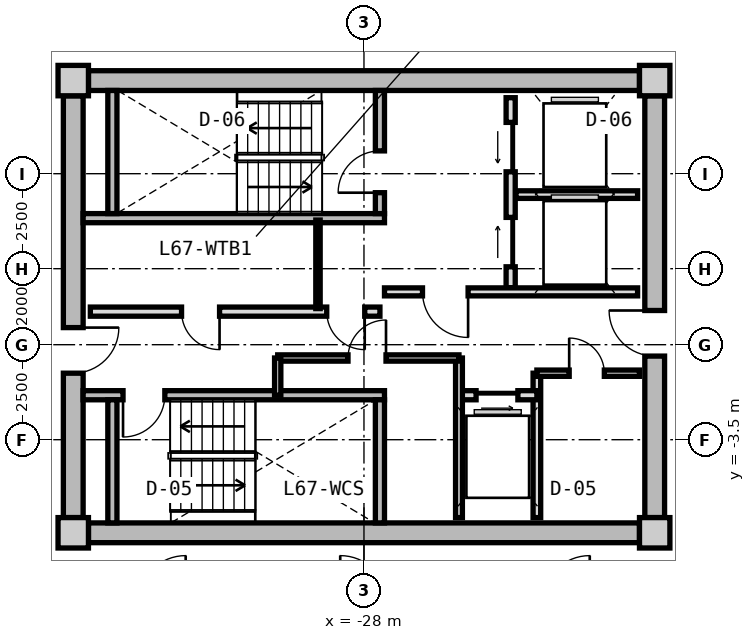
"""IFC4 building model, lengths in metres.
Left out: names, types, materials, properties, quantities, classifications, styles, units other than length and angle.
Written with IfcOpenShell. Run it as: python <this file> out.ifc"""

import sys

from ifc_helpers import new_model, si_unit, direction, frame, frame_2d, origin, origin_2d, place, context, subcontext, project, spatial, rectangle, extrude, source, transform, mapped, element, fill, save


model = new_model("IFC4")
c1 = context("Model", 3, precision=1e-05, world=origin(), true_north=direction((0.0, 1.0)))
c2 = subcontext(c1, "Body", "Model", "MODEL_VIEW")
j1 = project(units=[si_unit("LENGTHUNIT", "METRE"), si_unit("PLANEANGLEUNIT", "RADIAN")], contexts=[c1])
p1 = place(None, origin())
s1 = spatial("IfcSite", under=j1, at=p1, CompositionType="ELEMENT")
p2 = place(p1, origin())
s2 = spatial("IfcBuilding", under=s1, at=p2, CompositionType="ELEMENT")
p3 = place(p2, frame((0.0, 0.0, 216.95)))
s3 = spatial("IfcBuildingStorey", under=s2, at=p3, CompositionType="ELEMENT", Elevation=216.95)
m1 = source(origin(), c2, "Body", "SweptSolid", [
    extrude(rectangle(XDim=0.8, YDim=0.8, at=origin_2d()), origin(), (0.0, 0.0, 1.0), 3.05),
])
for number, where, z_axis, x_axis in (
    (1, (-35.65, -5.95, 0.0), (0.0, 0.0, 1.0), (1.0, 0.0, 0.0)),
    (2, (-20.35, -5.95, 0.0), (0.0, 0.0, 1.0), (1.0, 0.0, 0.0)),
    (3, (-20.35, 5.95, 0.0), (0.0, 0.0, 1.0), (1.0, 0.0, 0.0)),
    (4, (-35.65, 5.95, 0.0), (0.0, 0.0, 1.0), (1.0, 0.0, 0.0)),
):
    element("IfcColumn", number, at=place(p3, frame(where, z_axis=z_axis, x_axis=x_axis)), inside=s3, PredefinedType="COLUMN", context=c2, shape_type="MappedRepresentation", body=[
        mapped(m1, transform((0.0, 0.0, 0.0), x_axis=(1.0, 0.0, 0.0), y_axis=(0.0, 1.0, 0.0), z_axis=(0.0, 0.0, 1.0), scale=1.0)),
    ])
m2 = source(origin(), c2, "Body", "SweptSolid", [
    extrude(rectangle(XDim=14.5, YDim=0.52, at=frame_2d((7.25, 0.0))), origin(), (0.0, 0.0, 1.0), 2.76),
])
for number, where, z_axis, x_axis in (
    (5, (-35.25, 5.95, 0.0), (0.0, 0.0, 1.0), (1.0, 0.0, 0.0)),
    (6, (-20.75, -5.95, 0.0), (0.0, 0.0, 1.0), (-1.0, 0.0, 0.0)),
):
    element("IfcWall", number, at=place(p3, frame(where, z_axis=z_axis, x_axis=x_axis)), inside=s3, PredefinedType="SHEAR", context=c2, shape_type="MappedRepresentation", body=[
        mapped(m2, transform((0.0, 0.0, 0.0), x_axis=(1.0, 0.0, 0.0), y_axis=(0.0, 1.0, 0.0), z_axis=(0.0, 0.0, 1.0), scale=1.0)),
    ])
m3 = source(origin(), c2, "Body", "SweptSolid", [
    extrude(rectangle(XDim=11.1, YDim=0.52, at=frame_2d((5.55, 0.0))), origin(), (0.0, 0.0, 1.0), 2.76),
])
p4 = place(p3, frame((-35.65, -5.55, 0.0), z_axis=(0.0, 0.0, 1.0), x_axis=(0.0, 1.0, 0.0)))
e7 = element("IfcWall", 7, at=p4, inside=s3, PredefinedType="SHEAR", context=c2, shape_type="MappedRepresentation", body=[
    mapped(m3, transform((0.0, 0.0, 0.0), x_axis=(1.0, 0.0, 0.0), y_axis=(0.0, 1.0, 0.0), z_axis=(0.0, 0.0, 1.0), scale=1.0)),
])
p5 = place(p4, frame((3.8, 0.0, 0.0)))
e8 = element("IfcOpeningElement", 8, at=p5, cuts=e7, PredefinedType="OPENING", context=c2, shape_type="SweptSolid", body=[
    extrude(rectangle(XDim=1.2, YDim=2.15, at=frame_2d((0.6, 1.075))), frame((0.0, 0.27, 0.0), z_axis=(0.0, -1.0, 0.0), x_axis=(1.0, 0.0, 0.0)), (0.0, 0.0, 1.0), 0.54),
])
p6 = place(p3, frame((-20.35, 5.55, 0.0), z_axis=(0.0, 0.0, 1.0), x_axis=(0.0, -1.0, 0.0)))
e9 = element("IfcWall", 9, at=p6, inside=s3, PredefinedType="SHEAR", context=c2, shape_type="MappedRepresentation", body=[
    mapped(m3, transform((0.0, 0.0, 0.0), x_axis=(1.0, 0.0, 0.0), y_axis=(0.0, 1.0, 0.0), z_axis=(0.0, 0.0, 1.0), scale=1.0)),
])
p7 = place(p6, frame((5.65, 0.0, 0.0)))
e10 = element("IfcOpeningElement", 10, at=p7, cuts=e9, PredefinedType="OPENING", context=c2, shape_type="SweptSolid", body=[
    extrude(rectangle(XDim=1.2, YDim=2.15, at=frame_2d((0.6, 1.075))), frame((0.0, 0.27, 0.0), z_axis=(0.0, -1.0, 0.0), x_axis=(1.0, 0.0, 0.0)), (0.0, 0.0, 1.0), 0.54),
])
m4 = source(origin(), c2, "Body", "SweptSolid", [
    extrude(rectangle(XDim=7.93, YDim=0.24, at=frame_2d((3.965, 0.0))), origin(), (0.0, 0.0, 1.0), 2.76),
])
p8 = place(p3, frame((-35.39, 2.33, 0.0), z_axis=(0.0, 0.0, 1.0), x_axis=(1.0, 0.0, 0.0)))
e11 = element("IfcWall", 11, at=p8, inside=s3, PredefinedType="PARTITIONING", context=c2, shape_type="MappedRepresentation", body=[
    mapped(m4, transform((0.0, 0.0, 0.0), x_axis=(1.0, 0.0, 0.0), y_axis=(0.0, 1.0, 0.0), z_axis=(0.0, 0.0, 1.0), scale=1.0)),
])
m5 = source(origin(), c2, "Body", "SweptSolid", [
    extrude(rectangle(XDim=3.24, YDim=0.24, at=frame_2d((1.62, 0.0))), origin(), (0.0, 0.0, 1.0), 2.76),
])
p9 = place(p3, frame((-34.62, 2.45, 0.0), z_axis=(0.0, 0.0, 1.0), x_axis=(0.0, 1.0, 0.0)))
e12 = element("IfcWall", 12, at=p9, inside=s3, PredefinedType="PARTITIONING", context=c2, shape_type="MappedRepresentation", body=[
    mapped(m5, transform((0.0, 0.0, 0.0), x_axis=(1.0, 0.0, 0.0), y_axis=(0.0, 1.0, 0.0), z_axis=(0.0, 0.0, 1.0), scale=1.0)),
])
p10 = place(p3, frame((-27.58, 2.45, 0.0), z_axis=(0.0, 0.0, 1.0), x_axis=(0.0, 1.0, 0.0)))
e13 = element("IfcWall", 13, at=p10, inside=s3, PredefinedType="PARTITIONING", context=c2, shape_type="MappedRepresentation", body=[
    mapped(m5, transform((0.0, 0.0, 0.0), x_axis=(1.0, 0.0, 0.0), y_axis=(0.0, 1.0, 0.0), z_axis=(0.0, 0.0, 1.0), scale=1.0)),
])
p11 = place(p10, frame((0.55, 0.0, 0.0)))
e14 = element("IfcOpeningElement", 14, at=p11, cuts=e13, PredefinedType="OPENING", context=c2, shape_type="SweptSolid", body=[
    extrude(rectangle(XDim=1.1, YDim=2.15, at=frame_2d((0.55, 1.075))), frame((0.0, 0.13, 0.0), z_axis=(0.0, -1.0, 0.0), x_axis=(1.0, 0.0, 0.0)), (0.0, 0.0, 1.0), 0.26),
])
p12 = place(p3, frame((-35.39, -2.33, 0.0), z_axis=(0.0, 0.0, 1.0), x_axis=(1.0, 0.0, 0.0)))
e15 = element("IfcWall", 15, at=p12, inside=s3, PredefinedType="PARTITIONING", context=c2, shape_type="MappedRepresentation", body=[
    mapped(m4, transform((0.0, 0.0, 0.0), x_axis=(1.0, 0.0, 0.0), y_axis=(0.0, 1.0, 0.0), z_axis=(0.0, 0.0, 1.0), scale=1.0)),
])
p13 = place(p12, frame((1.05, 0.0, 0.0)))
e16 = element("IfcOpeningElement", 16, at=p13, cuts=e15, PredefinedType="OPENING", context=c2, shape_type="SweptSolid", body=[
    extrude(rectangle(XDim=1.1, YDim=2.15, at=frame_2d((0.55, 1.075))), frame((0.0, 0.13, 0.0), z_axis=(0.0, -1.0, 0.0), x_axis=(1.0, 0.0, 0.0)), (0.0, 0.0, 1.0), 0.26),
])
for number, where, z_axis, x_axis in (
    (17, (-34.62, -5.69, 0.0), (0.0, 0.0, 1.0), (0.0, 1.0, 0.0)),
    (18, (-27.58, -5.69, 0.0), (0.0, 0.0, 1.0), (0.0, 1.0, 0.0)),
):
    element("IfcWall", number, at=place(p3, frame(where, z_axis=z_axis, x_axis=x_axis)), inside=s3, PredefinedType="PARTITIONING", context=c2, shape_type="MappedRepresentation", body=[
        mapped(m5, transform((0.0, 0.0, 0.0), x_axis=(1.0, 0.0, 0.0), y_axis=(0.0, 1.0, 0.0), z_axis=(0.0, 0.0, 1.0), scale=1.0)),
    ])
m6 = source(origin(), c2, "Body", "SweptSolid", [
    extrude(rectangle(XDim=5.0, YDim=0.24, at=frame_2d((2.5, 0.0))), origin(), (0.0, 0.0, 1.0), 2.745),
])
p14 = place(p3, frame((-24.14, 0.5, 0.0), z_axis=(0.0, 0.0, 1.0), x_axis=(0.0, 1.0, 0.0)))
e19 = element("IfcWall", 19, at=p14, inside=s3, PredefinedType="PARTITIONING", context=c2, shape_type="MappedRepresentation", body=[
    mapped(m6, transform((0.0, 0.0, 0.0), x_axis=(1.0, 0.0, 0.0), y_axis=(0.0, 1.0, 0.0), z_axis=(0.0, 0.0, 1.0), scale=1.0)),
])
p15 = place(p14, frame((3.05, 0.0, 0.0)))
e20 = element("IfcOpeningElement", 20, at=p15, cuts=e19, PredefinedType="OPENING", context=c2, shape_type="SweptSolid", body=[
    extrude(rectangle(XDim=1.3, YDim=2.2, at=frame_2d((0.65, 1.1))), frame((0.0, 0.13, 0.0), z_axis=(0.0, -1.0, 0.0), x_axis=(1.0, 0.0, 0.0)), (0.0, 0.0, 1.0), 0.26),
])
p16 = place(p14, frame((0.55, 0.0, 0.0)))
e21 = element("IfcOpeningElement", 21, at=p16, cuts=e19, PredefinedType="OPENING", context=c2, shape_type="SweptSolid", body=[
    extrude(rectangle(XDim=1.3, YDim=2.2, at=frame_2d((0.65, 1.1))), frame((0.0, 0.13, 0.0), z_axis=(0.0, -1.0, 0.0), x_axis=(1.0, 0.0, 0.0)), (0.0, 0.0, 1.0), 0.26),
])
m7 = source(origin(), c2, "Body", "SweptSolid", [
    extrude(rectangle(XDim=3.2, YDim=0.2, at=frame_2d((1.6, 0.0))), origin(), (0.0, 0.0, 1.0), 2.745),
])
p17 = place(p3, frame((-24.0, 2.95, 0.0), z_axis=(0.0, 0.0, 1.0), x_axis=(1.0, 0.0, 0.0)))
e22 = element("IfcWall", 22, at=p17, inside=s3, PredefinedType="PARTITIONING", context=c2, shape_type="MappedRepresentation", body=[
    mapped(m7, transform((0.0, 0.0, 0.0), x_axis=(1.0, 0.0, 0.0), y_axis=(0.0, 1.0, 0.0), z_axis=(0.0, 0.0, 1.0), scale=1.0)),
])
m8 = source(origin(), c2, "Body", "SweptSolid", [
    extrude(rectangle(XDim=6.66, YDim=0.21, at=frame_2d((3.33, 0.0))), origin(), (0.0, 0.0, 1.0), 2.745),
])
p18 = place(p3, frame((-27.46, 0.39, 0.0), z_axis=(0.0, 0.0, 1.0), x_axis=(1.0, 0.0, 0.0)))
e23 = element("IfcWall", 23, at=p18, inside=s3, PredefinedType="PARTITIONING", context=c2, shape_type="MappedRepresentation", body=[
    mapped(m8, transform((0.0, 0.0, 0.0), x_axis=(1.0, 0.0, 0.0), y_axis=(0.0, 1.0, 0.0), z_axis=(0.0, 0.0, 1.0), scale=1.0)),
])
p19 = place(p18, frame((1.0, 0.0, 0.0)))
e24 = element("IfcOpeningElement", 24, at=p19, cuts=e23, PredefinedType="OPENING", context=c2, shape_type="SweptSolid", body=[
    extrude(rectangle(XDim=1.2, YDim=2.15, at=frame_2d((0.6, 1.075))), frame((0.0, 0.115, 0.0), z_axis=(0.0, -1.0, 0.0), x_axis=(1.0, 0.0, 0.0)), (0.0, 0.0, 1.0), 0.23),
])
m9 = source(origin(), c2, "Body", "SweptSolid", [
    extrude(rectangle(XDim=7.62, YDim=0.24, at=frame_2d((3.81, 0.0))), origin(), (0.0, 0.0, 1.0), 2.745),
])
p20 = place(p3, frame((-35.2, -0.13, 0.0), z_axis=(0.0, 0.0, 1.0), x_axis=(1.0, 0.0, 0.0)))
e25 = element("IfcWall", 25, at=p20, inside=s3, PredefinedType="PARTITIONING", context=c2, shape_type="MappedRepresentation", body=[
    mapped(m9, transform((0.0, 0.0, 0.0), x_axis=(1.0, 0.0, 0.0), y_axis=(0.0, 1.0, 0.0), z_axis=(0.0, 0.0, 1.0), scale=1.0)),
])
p21 = place(p20, frame((6.22, 0.0, 0.0)))
e26 = element("IfcOpeningElement", 26, at=p21, cuts=e25, PredefinedType="OPENING", context=c2, shape_type="SweptSolid", body=[
    extrude(rectangle(XDim=1.0, YDim=2.1, at=frame_2d((0.5, 1.05))), frame((0.0, 0.13, 0.0), z_axis=(0.0, -1.0, 0.0), x_axis=(1.0, 0.0, 0.0)), (0.0, 0.0, 1.0), 0.26),
])
p22 = place(p20, frame((2.4, 0.0, 0.0)))
e27 = element("IfcOpeningElement", 27, at=p22, cuts=e25, PredefinedType="OPENING", context=c2, shape_type="SweptSolid", body=[
    extrude(rectangle(XDim=1.0, YDim=2.1, at=frame_2d((0.5, 1.05))), frame((0.0, 0.13, 0.0), z_axis=(0.0, -1.0, 0.0), x_axis=(1.0, 0.0, 0.0)), (0.0, 0.0, 1.0), 0.26),
])
m10 = source(origin(), c2, "Body", "SweptSolid", [
    extrude(rectangle(XDim=2.33, YDim=0.115, at=frame_2d((1.165, 0.0))), origin(), (0.0, 0.0, 1.0), 2.745),
])
p23 = place(p3, frame((-29.21, -0.05, 0.0), z_axis=(0.0, 0.0, 1.0), x_axis=(0.0, 1.0, 0.0)))
e28 = element("IfcWall", 28, at=p23, inside=s3, PredefinedType="PARTITIONING", context=c2, shape_type="MappedRepresentation", body=[
    mapped(m10, transform((0.0, 0.0, 0.0), x_axis=(1.0, 0.0, 0.0), y_axis=(0.0, 1.0, 0.0), z_axis=(0.0, 0.0, 1.0), scale=1.0)),
])
m11 = source(origin(), c2, "Body", "SweptSolid", [
    extrude(rectangle(XDim=3.8, YDim=0.2, at=frame_2d((1.9, 0.0))), origin(), (0.0, 0.0, 1.0), 2.745),
])
p24 = place(p3, frame((-23.45, -5.55, 0.0), z_axis=(0.0, 0.0, 1.0), x_axis=(0.0, 1.0, 0.0)))
e29 = element("IfcWall", 29, at=p24, inside=s3, PredefinedType="PARTITIONING", context=c2, shape_type="MappedRepresentation", body=[
    mapped(m11, transform((0.0, 0.0, 0.0), x_axis=(1.0, 0.0, 0.0), y_axis=(0.0, 1.0, 0.0), z_axis=(0.0, 0.0, 1.0), scale=1.0)),
])
m12 = source(origin(), c2, "Body", "SweptSolid", [
    extrude(rectangle(XDim=2.05, YDim=0.24, at=frame_2d((1.025, 0.0))), origin(), (0.0, 0.0, 1.0), 2.745),
])
p25 = place(p3, frame((-25.5, -2.33, 0.0), z_axis=(0.0, 0.0, 1.0), x_axis=(1.0, 0.0, 0.0)))
e30 = element("IfcWall", 30, at=p25, inside=s3, PredefinedType="PARTITIONING", context=c2, shape_type="MappedRepresentation", body=[
    mapped(m12, transform((0.0, 0.0, 0.0), x_axis=(1.0, 0.0, 0.0), y_axis=(0.0, 1.0, 0.0), z_axis=(0.0, 0.0, 1.0), scale=1.0)),
])
p26 = place(p25, frame((0.45, 0.0, 0.0)))
e31 = element("IfcOpeningElement", 31, at=p26, cuts=e30, PredefinedType="OPENING", context=c2, shape_type="SweptSolid", body=[
    extrude(rectangle(XDim=1.1, YDim=2.2, at=frame_2d((0.55, 1.1))), frame((0.0, 0.13, 0.0), z_axis=(0.0, -1.0, 0.0), x_axis=(1.0, 0.0, 0.0)), (0.0, 0.0, 1.0), 0.26),
])
m13 = source(origin(), c2, "Body", "SweptSolid", [
    extrude(rectangle(XDim=4.2, YDim=0.18, at=frame_2d((2.1, 0.0))), origin(), (0.0, 0.0, 1.0), 2.745),
])
p27 = place(p3, frame((-25.5, -5.55, 0.0), z_axis=(0.0, 0.0, 1.0), x_axis=(0.0, 1.0, 0.0)))
e32 = element("IfcWall", 32, at=p27, inside=s3, PredefinedType="PARTITIONING", context=c2, shape_type="MappedRepresentation", body=[
    mapped(m13, transform((0.0, 0.0, 0.0), x_axis=(1.0, 0.0, 0.0), y_axis=(0.0, 1.0, 0.0), z_axis=(0.0, 0.0, 1.0), scale=1.0)),
])
m14 = source(origin(), c2, "Body", "SweptSolid", [
    extrude(rectangle(XDim=4.77, YDim=0.165, at=frame_2d((2.385, 0.0))), origin(), (0.0, 0.0, 1.0), 2.745),
])
p28 = place(p3, frame((-30.27, -1.35, 0.0), z_axis=(0.0, 0.0, 1.0), x_axis=(1.0, 0.0, 0.0)))
e33 = element("IfcWall", 33, at=p28, inside=s3, PredefinedType="PARTITIONING", context=c2, shape_type="MappedRepresentation", body=[
    mapped(m14, transform((0.0, 0.0, 0.0), x_axis=(1.0, 0.0, 0.0), y_axis=(0.0, 1.0, 0.0), z_axis=(0.0, 0.0, 1.0), scale=1.0)),
])
p29 = place(p28, frame((1.85, 0.0, 0.0)))
e34 = element("IfcOpeningElement", 34, at=p29, cuts=e33, PredefinedType="OPENING", context=c2, shape_type="SweptSolid", body=[
    extrude(rectangle(XDim=1.0, YDim=2.1, at=frame_2d((0.5, 1.05))), frame((0.0, 0.093, 0.0), z_axis=(0.0, -1.0, 0.0), x_axis=(1.0, 0.0, 0.0)), (0.0, 0.0, 1.0), 0.185),
])
m15 = source(origin(), c2, "Body", "SweptSolid", [
    extrude(rectangle(XDim=0.98, YDim=0.165, at=frame_2d((0.49, 0.0))), origin(), (0.0, 0.0, 1.0), 2.745),
])
p30 = place(p3, frame((-30.27, -2.33, 0.0), z_axis=(0.0, 0.0, 1.0), x_axis=(0.0, 1.0, 0.0)))
e35 = element("IfcWall", 35, at=p30, inside=s3, PredefinedType="PARTITIONING", context=c2, shape_type="MappedRepresentation", body=[
    mapped(m15, transform((0.0, 0.0, 0.0), x_axis=(1.0, 0.0, 0.0), y_axis=(0.0, 1.0, 0.0), z_axis=(0.0, 0.0, 1.0), scale=1.0)),
])
m16 = source(origin(), c2, "Body", "SweptSolid", [
    extrude(rectangle(XDim=2.7, YDim=0.165, at=frame_2d((1.35, 0.0))), origin(), (0.0, 0.0, 1.0), 2.745),
])
p31 = place(p3, frame((-23.45, -1.75, 0.0), z_axis=(0.0, 0.0, 1.0), x_axis=(1.0, 0.0, 0.0)))
e36 = element("IfcWall", 36, at=p31, inside=s3, PredefinedType="PARTITIONING", context=c2, shape_type="MappedRepresentation", body=[
    mapped(m16, transform((0.0, 0.0, 0.0), x_axis=(1.0, 0.0, 0.0), y_axis=(0.0, 1.0, 0.0), z_axis=(0.0, 0.0, 1.0), scale=1.0)),
])
p32 = place(p31, frame((0.85, 0.0, 0.0)))
e37 = element("IfcOpeningElement", 37, at=p32, cuts=e36, PredefinedType="OPENING", context=c2, shape_type="SweptSolid", body=[
    extrude(rectangle(XDim=0.925, YDim=2.1, at=frame_2d((0.462, 1.05))), frame((0.0, 0.093, 0.0), z_axis=(0.0, -1.0, 0.0), x_axis=(1.0, 0.0, 0.0)), (0.0, 0.0, 1.0), 0.185),
])
m17 = source(origin(), c2, "Body", "SweptSolid", [
    extrude(rectangle(XDim=1.1, YDim=2.15, at=frame_2d((0.55, 1.075))), frame((0.0, 0.025, 0.0), z_axis=(0.0, -1.0, 0.0), x_axis=(1.0, 0.0, 0.0)), (0.0, 0.0, 1.0), 0.05),
])
p33 = place(p11, origin())
e38 = element("IfcDoor", 38, at=p33, inside=s3, OperationType="SINGLE_SWING_LEFT", PredefinedType="DOOR", context=c2, shape_type="MappedRepresentation", body=[
    mapped(m17, transform((0.0, 0.0, 0.0), x_axis=(1.0, 0.0, 0.0), y_axis=(0.0, 1.0, 0.0), z_axis=(0.0, 0.0, 1.0), scale=1.0)),
])
fill(e14, e38)
p34 = place(p13, frame((1.1, 0.0, 0.0), z_axis=(0.0, 0.0, 1.0), x_axis=(-1.0, 0.0, 0.0)))
e39 = element("IfcDoor", 39, at=p34, inside=s3, OperationType="SINGLE_SWING_RIGHT", PredefinedType="DOOR", context=c2, shape_type="MappedRepresentation", body=[
    mapped(m17, transform((0.0, 0.0, 0.0), x_axis=(1.0, 0.0, 0.0), y_axis=(0.0, 1.0, 0.0), z_axis=(0.0, 0.0, 1.0), scale=1.0)),
])
fill(e16, e39)
m18 = source(origin(), c2, "Body", "SweptSolid", [
    extrude(rectangle(XDim=1.3, YDim=2.2, at=frame_2d((0.65, 1.1))), frame((0.0, 0.025, 0.0), z_axis=(0.0, -1.0, 0.0), x_axis=(1.0, 0.0, 0.0)), (0.0, 0.0, 1.0), 0.05),
])
p35 = place(p15, origin())
e40 = element("IfcDoor", 40, at=p35, inside=s3, OperationType="SLIDING_TO_LEFT", PredefinedType="DOOR", context=c2, shape_type="MappedRepresentation", body=[
    mapped(m18, transform((0.0, 0.0, 0.0), x_axis=(1.0, 0.0, 0.0), y_axis=(0.0, 1.0, 0.0), z_axis=(0.0, 0.0, 1.0), scale=1.0)),
])
fill(e20, e40)
p36 = place(p16, origin())
e41 = element("IfcDoor", 41, at=p36, inside=s3, OperationType="SLIDING_TO_RIGHT", PredefinedType="DOOR", context=c2, shape_type="MappedRepresentation", body=[
    mapped(m18, transform((0.0, 0.0, 0.0), x_axis=(1.0, 0.0, 0.0), y_axis=(0.0, 1.0, 0.0), z_axis=(0.0, 0.0, 1.0), scale=1.0)),
])
fill(e21, e41)
m19 = source(origin(), c2, "Body", "SweptSolid", [
    extrude(rectangle(XDim=1.2, YDim=2.15, at=frame_2d((0.6, 1.075))), frame((0.0, 0.025, 0.0), z_axis=(0.0, -1.0, 0.0), x_axis=(1.0, 0.0, 0.0)), (0.0, 0.0, 1.0), 0.05),
])
p37 = place(p19, frame((1.2, 0.0, 0.0), z_axis=(0.0, 0.0, 1.0), x_axis=(-1.0, 0.0, 0.0)))
e42 = element("IfcDoor", 42, at=p37, inside=s3, OperationType="SINGLE_SWING_LEFT", PredefinedType="DOOR", context=c2, shape_type="MappedRepresentation", body=[
    mapped(m19, transform((0.0, 0.0, 0.0), x_axis=(1.0, 0.0, 0.0), y_axis=(0.0, 1.0, 0.0), z_axis=(0.0, 0.0, 1.0), scale=1.0)),
])
fill(e24, e42)
p38 = place(p5, frame((1.2, 0.0, 0.0), z_axis=(0.0, 0.0, 1.0), x_axis=(-1.0, 0.0, 0.0)))
e43 = element("IfcDoor", 43, at=p38, inside=s3, OperationType="SINGLE_SWING_LEFT", PredefinedType="DOOR", context=c2, shape_type="MappedRepresentation", body=[
    mapped(m19, transform((0.0, 0.0, 0.0), x_axis=(1.0, 0.0, 0.0), y_axis=(0.0, 1.0, 0.0), z_axis=(0.0, 0.0, 1.0), scale=1.0)),
])
fill(e8, e43)
p39 = place(p7, frame((1.2, 0.0, 0.0), z_axis=(0.0, 0.0, 1.0), x_axis=(-1.0, 0.0, 0.0)))
e44 = element("IfcDoor", 44, at=p39, inside=s3, OperationType="SINGLE_SWING_RIGHT", PredefinedType="DOOR", context=c2, shape_type="MappedRepresentation", body=[
    mapped(m19, transform((0.0, 0.0, 0.0), x_axis=(1.0, 0.0, 0.0), y_axis=(0.0, 1.0, 0.0), z_axis=(0.0, 0.0, 1.0), scale=1.0)),
])
fill(e10, e44)
m20 = source(origin(), c2, "Body", "SweptSolid", [
    extrude(rectangle(XDim=1.0, YDim=2.1, at=frame_2d((0.5, 1.05))), frame((0.0, 0.025, 0.0), z_axis=(0.0, -1.0, 0.0), x_axis=(1.0, 0.0, 0.0)), (0.0, 0.0, 1.0), 0.05),
])
p40 = place(p21, frame((1.0, 0.0, 0.0), z_axis=(0.0, 0.0, 1.0), x_axis=(-1.0, 0.0, 0.0)))
e45 = element("IfcDoor", 45, at=p40, inside=s3, OperationType="SINGLE_SWING_LEFT", PredefinedType="DOOR", context=c2, shape_type="MappedRepresentation", body=[
    mapped(m20, transform((0.0, 0.0, 0.0), x_axis=(1.0, 0.0, 0.0), y_axis=(0.0, 1.0, 0.0), z_axis=(0.0, 0.0, 1.0), scale=1.0)),
])
fill(e26, e45)
p41 = place(p22, frame((1.0, 0.0, 0.0), z_axis=(0.0, 0.0, 1.0), x_axis=(-1.0, 0.0, 0.0)))
e46 = element("IfcDoor", 46, at=p41, inside=s3, OperationType="SINGLE_SWING_LEFT", PredefinedType="DOOR", context=c2, shape_type="MappedRepresentation", body=[
    mapped(m20, transform((0.0, 0.0, 0.0), x_axis=(1.0, 0.0, 0.0), y_axis=(0.0, 1.0, 0.0), z_axis=(0.0, 0.0, 1.0), scale=1.0)),
])
fill(e27, e46)
m21 = source(origin(), c2, "Body", "SweptSolid", [
    extrude(rectangle(XDim=1.1, YDim=2.2, at=frame_2d((0.55, 1.1))), frame((0.0, 0.025, 0.0), z_axis=(0.0, -1.0, 0.0), x_axis=(1.0, 0.0, 0.0)), (0.0, 0.0, 1.0), 0.05),
])
p42 = place(p26, frame((1.1, 0.0, 0.0), z_axis=(0.0, 0.0, 1.0), x_axis=(-1.0, 0.0, 0.0)))
e47 = element("IfcDoor", 47, at=p42, inside=s3, OperationType="SLIDING_TO_RIGHT", PredefinedType="DOOR", context=c2, shape_type="MappedRepresentation", body=[
    mapped(m21, transform((0.0, 0.0, 0.0), x_axis=(1.0, 0.0, 0.0), y_axis=(0.0, 1.0, 0.0), z_axis=(0.0, 0.0, 1.0), scale=1.0)),
])
fill(e31, e47)
p43 = place(p29, origin())
e48 = element("IfcDoor", 48, at=p43, inside=s3, OperationType="SINGLE_SWING_RIGHT", PredefinedType="DOOR", context=c2, shape_type="MappedRepresentation", body=[
    mapped(m20, transform((0.0, 0.0, 0.0), x_axis=(1.0, 0.0, 0.0), y_axis=(0.0, 1.0, 0.0), z_axis=(0.0, 0.0, 1.0), scale=1.0)),
])
fill(e34, e48)
m22 = source(origin(), c2, "Body", "SweptSolid", [
    extrude(rectangle(XDim=0.925, YDim=2.1, at=frame_2d((0.462, 1.05))), frame((0.0, 0.025, 0.0), z_axis=(0.0, -1.0, 0.0), x_axis=(1.0, 0.0, 0.0)), (0.0, 0.0, 1.0), 0.05),
])
p44 = place(p32, origin())
e49 = element("IfcDoor", 49, at=p44, inside=s3, OperationType="SINGLE_SWING_LEFT", PredefinedType="DOOR", context=c2, shape_type="MappedRepresentation", body=[
    mapped(m22, transform((0.0, 0.0, 0.0), x_axis=(1.0, 0.0, 0.0), y_axis=(0.0, 1.0, 0.0), z_axis=(0.0, 0.0, 1.0), scale=1.0)),
])
fill(e37, e49)
save(model, sys.argv[1])
